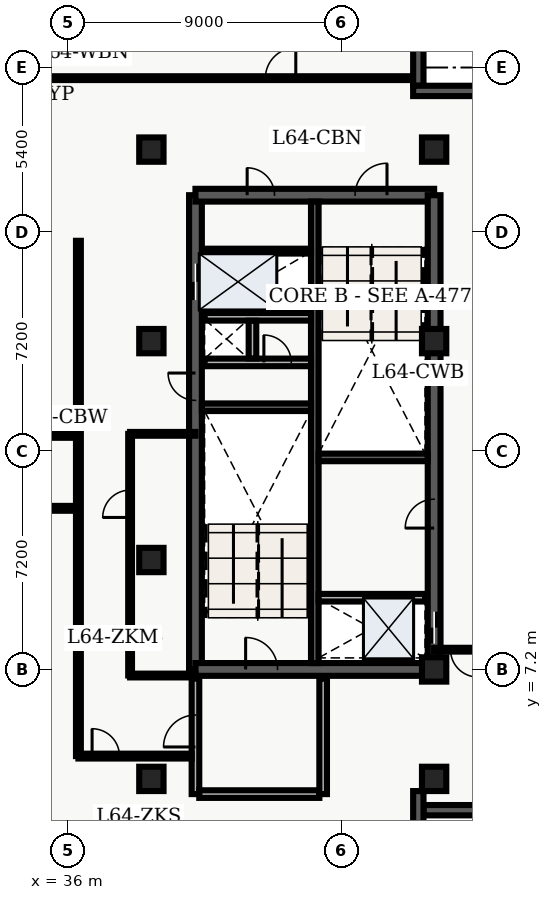
"""IFC4 building model, lengths in metres.
Left out: names, types, materials, properties, quantities, classifications, styles, units other than length and angle.
Written with IfcOpenShell. Run it as: python <this file> out.ifc"""

import sys

from ifc_helpers import new_model, entity, si_unit, converted_unit, direction, frame, origin_with_axes, origin_2d_with_axis, place, context, subcontext, project, spatial, polyline, rectangle, outline, extrude, element, fill, save


model = new_model("IFC4")
c1 = context("Model", 3, precision=1e-05, world=origin_with_axes(), true_north=direction((0.0, 1.0)))
c2 = subcontext(c1, "Body", "Model", "MODEL_VIEW")
j1 = project(units=[si_unit("LENGTHUNIT", "METRE"), converted_unit("PLANEANGLEUNIT", "DEGREE", entity("IfcPlaneAngleMeasure", 0.017), si_unit("PLANEANGLEUNIT", "RADIAN"), dimensions=[0, 0, 0, 0, 0, 0, 0])], contexts=[c1])
p1 = place(None, origin_with_axes())
s1 = spatial("IfcSite", under=j1, at=p1, CompositionType="ELEMENT")
p2 = place(p1, origin_with_axes())
s2 = spatial("IfcBuilding", under=s1, at=p2, CompositionType="ELEMENT")
p3 = place(p2, frame((0.0, 0.0, 260.7), z_axis=(0.0, 0.0, 1.0), x_axis=(1.0, 0.0, 0.0)))
s3 = spatial("IfcBuildingStorey", under=s2, at=p3, CompositionType="ELEMENT", Elevation=260.7)
p4 = place(p3, frame((40.2, 7.2, 0.0), z_axis=(0.0, 0.0, 1.0), x_axis=(0.0, 1.0, 0.0)))
e1 = element("IfcWall", 1, at=p4, inside=s3, PredefinedType="SHEAR", context=c2, shape_type="SweptSolid", body=[
    extrude(outline(polyline([(0.0, -0.21), (15.6, -0.21), (15.6, 0.21), (0.0, 0.21), (0.0, -0.21)])), origin_with_axes(), (0.0, 0.0, 1.0), 3.66),
])
p5 = place(p4, frame((12.75, 0.0, 0.0), z_axis=(0.0, 0.0, 1.0), x_axis=(1.0, 0.0, 0.0)))
e2 = element("IfcOpeningElement", 2, at=p5, cuts=e1, PredefinedType="OPENING", context=c2, shape_type="SweptSolid", body=[
    extrude(rectangle(XDim=1.2, YDim=0.44, at=origin_2d_with_axis()), origin_with_axes(), (0.0, 0.0, 1.0), 2.15),
])
p6 = place(p4, frame((9.3, 0.0, 0.0), z_axis=(0.0, 0.0, 1.0), x_axis=(1.0, 0.0, 0.0)))
e3 = element("IfcOpeningElement", 3, at=p6, cuts=e1, PredefinedType="OPENING", context=c2, shape_type="SweptSolid", body=[
    extrude(rectangle(XDim=0.9, YDim=0.44, at=origin_2d_with_axis()), origin_with_axes(), (0.0, 0.0, 1.0), 2.15),
])
p7 = place(p3, frame((40.2, 7.2, 0.0), z_axis=(0.0, 0.0, 1.0), x_axis=(1.0, 0.0, 0.0)))
e4 = element("IfcWall", 4, at=p7, inside=s3, PredefinedType="SHEAR", context=c2, shape_type="SweptSolid", body=[
    extrude(outline(polyline([(0.0, -0.21), (7.85, -0.21), (7.85, 0.21), (0.0, 0.21), (0.0, -0.21)])), origin_with_axes(), (0.0, 0.0, 1.0), 3.66),
])
p8 = place(p7, frame((2.175, 0.0, 0.0), z_axis=(0.0, 0.0, 1.0), x_axis=(1.0, 0.0, 0.0)))
e5 = element("IfcOpeningElement", 5, at=p8, cuts=e4, PredefinedType="OPENING", context=c2, shape_type="SweptSolid", body=[
    extrude(rectangle(XDim=1.05, YDim=0.44, at=origin_2d_with_axis()), origin_with_axes(), (0.0, 0.0, 1.0), 2.15),
])
p9 = place(p3, frame((40.2, 22.8, 0.0), z_axis=(0.0, 0.0, 1.0), x_axis=(1.0, 0.0, 0.0)))
e6 = element("IfcWall", 6, at=p9, inside=s3, PredefinedType="SHEAR", context=c2, shape_type="SweptSolid", body=[
    extrude(outline(polyline([(0.0, -0.21), (7.85, -0.21), (7.85, 0.21), (0.0, 0.21), (0.0, -0.21)])), origin_with_axes(), (0.0, 0.0, 1.0), 3.66),
])
p10 = place(p9, frame((5.775, 0.0, 0.0), z_axis=(0.0, 0.0, 1.0), x_axis=(1.0, 0.0, 0.0)))
e7 = element("IfcOpeningElement", 7, at=p10, cuts=e6, PredefinedType="OPENING", context=c2, shape_type="SweptSolid", body=[
    extrude(rectangle(XDim=1.05, YDim=0.44, at=origin_2d_with_axis()), origin_with_axes(), (0.0, 0.0, 1.0), 2.15),
])
p11 = place(p9, frame((2.15, 0.0, 0.0), z_axis=(0.0, 0.0, 1.0), x_axis=(1.0, 0.0, 0.0)))
e8 = element("IfcOpeningElement", 8, at=p11, cuts=e6, PredefinedType="OPENING", context=c2, shape_type="SweptSolid", body=[
    extrude(rectangle(XDim=0.9, YDim=0.44, at=origin_2d_with_axis()), origin_with_axes(), (0.0, 0.0, 1.0), 2.15),
])
p12 = place(p3, frame((48.05, 7.2, 0.0), z_axis=(0.0, 0.0, 1.0), x_axis=(0.0, 1.0, 0.0)))
e9 = element("IfcWall", 9, at=p12, inside=s3, PredefinedType="SHEAR", context=c2, shape_type="SweptSolid", body=[
    extrude(outline(polyline([(0.0, -0.21), (15.6, -0.21), (15.6, 0.21), (0.0, 0.21), (0.0, -0.21)])), origin_with_axes(), (0.0, 0.0, 1.0), 3.66),
])
p13 = place(p12, frame((1.375, 0.0, 0.0), z_axis=(0.0, 0.0, 1.0), x_axis=(1.0, 0.0, 0.0)))
e10 = element("IfcOpeningElement", 10, at=p13, cuts=e9, PredefinedType="OPENING", context=c2, shape_type="SweptSolid", body=[
    extrude(rectangle(XDim=1.05, YDim=0.44, at=origin_2d_with_axis()), origin_with_axes(), (0.0, 0.0, 1.0), 2.15),
])
p14 = place(p12, frame((5.125, 0.0, 0.0), z_axis=(0.0, 0.0, 1.0), x_axis=(1.0, 0.0, 0.0)))
e11 = element("IfcOpeningElement", 11, at=p14, cuts=e9, PredefinedType="OPENING", context=c2, shape_type="SweptSolid", body=[
    extrude(rectangle(XDim=0.95, YDim=0.44, at=origin_2d_with_axis()), origin_with_axes(), (0.0, 0.0, 1.0), 2.15),
])
p15 = place(p3, frame((44.125, 7.41, 0.0), z_axis=(0.0, 0.0, 1.0), x_axis=(0.0, 1.0, 0.0)))
e12 = element("IfcWall", 12, at=p15, inside=s3, PredefinedType="SHEAR", context=c2, shape_type="SweptSolid", body=[
    extrude(outline(polyline([(0.0, -0.125), (15.18, -0.125), (15.18, 0.125), (0.0, 0.125), (0.0, -0.125)])), origin_with_axes(), (0.0, 0.0, 1.0), 3.66),
])
for number, where, z_axis, x_axis in (
    (13, (40.41, 15.825, 0.0), (0.0, 0.0, 1.0), (1.0, 0.0, 0.0)),
    (14, (44.25, 14.175, 0.0), (0.0, 0.0, 1.0), (1.0, 0.0, 0.0)),
):
    element("IfcWall", number, at=place(p3, frame(where, z_axis=z_axis, x_axis=x_axis)), inside=s3, PredefinedType="SHEAR", context=c2, shape_type="SweptSolid", body=[
        extrude(outline(polyline([(0.0, -0.125), (3.59, -0.125), (3.59, 0.125), (0.0, 0.125), (0.0, -0.125)])), origin_with_axes(), (0.0, 0.0, 1.0), 3.66),
    ])
p16 = place(p3, frame((40.5, 17.3, 0.0), z_axis=(0.0, 0.0, 1.0), x_axis=(1.0, 0.0, 0.0)))
e15 = element("IfcWall", 15, at=p16, inside=s3, PredefinedType="SOLIDWALL", context=c2, shape_type="SweptSolid", body=[
    extrude(outline(polyline([(0.0, -0.125), (3.5, -0.125), (3.5, 0.125), (0.0, 0.125), (0.0, -0.125)])), origin_with_axes(), (0.0, 0.0, 1.0), 2.7),
])
p17 = place(p16, frame((2.4, 0.0, 0.0), z_axis=(0.0, 0.0, 1.0), x_axis=(1.0, 0.0, 0.0)))
e16 = element("IfcOpeningElement", 16, at=p17, cuts=e15, PredefinedType="OPENING", context=c2, shape_type="SweptSolid", body=[
    extrude(rectangle(XDim=0.9, YDim=0.27, at=origin_2d_with_axis()), origin_with_axes(), (0.0, 0.0, 1.0), 2.15),
])
p18 = place(p3, frame((40.5, 18.8, 0.0), z_axis=(0.0, 0.0, 1.0), x_axis=(1.0, 0.0, 0.0)))
e17 = element("IfcWall", 17, at=p18, inside=s3, PredefinedType="SOLIDWALL", context=c2, shape_type="SweptSolid", body=[
    extrude(outline(polyline([(0.0, -0.125), (3.5, -0.125), (3.5, 0.125), (0.0, 0.125), (0.0, -0.125)])), origin_with_axes(), (0.0, 0.0, 1.0), 2.7),
])
p19 = place(p3, frame((42.075, 17.43, 0.0), z_axis=(0.0, 0.0, 1.0), x_axis=(0.0, 1.0, 0.0)))
e18 = element("IfcWall", 18, at=p19, inside=s3, PredefinedType="SOLIDWALL", context=c2, shape_type="SweptSolid", body=[
    extrude(outline(polyline([(0.0, -0.125), (1.24, -0.125), (1.24, 0.125), (0.0, 0.125), (0.0, -0.125)])), origin_with_axes(), (0.0, 0.0, 1.0), 2.7),
])
p20 = place(p3, frame((40.2, 3.1, 0.0), z_axis=(0.0, 0.0, 1.0), x_axis=(0.0, 1.0, 0.0)))
e19 = element("IfcWall", 19, at=p20, inside=s3, PredefinedType="SOLIDWALL", context=c2, shape_type="SweptSolid", body=[
    extrude(outline(polyline([(0.0, -0.125), (3.8, -0.125), (3.8, 0.125), (0.0, 0.125), (0.0, -0.125)])), origin_with_axes(), (0.0, 0.0, 1.0), 2.7),
])
p21 = place(p20, frame((2.075, 0.0, 0.0), z_axis=(0.0, 0.0, 1.0), x_axis=(1.0, 0.0, 0.0)))
e20 = element("IfcOpeningElement", 20, at=p21, cuts=e19, PredefinedType="OPENING", context=c2, shape_type="SweptSolid", body=[
    extrude(rectangle(XDim=1.05, YDim=0.27, at=origin_2d_with_axis()), origin_with_axes(), (0.0, 0.0, 1.0), 2.15),
])
p22 = place(p3, frame((40.325, 3.1, 0.0), z_axis=(0.0, 0.0, 1.0), x_axis=(1.0, 0.0, 0.0)))
e21 = element("IfcWall", 21, at=p22, inside=s3, PredefinedType="SOLIDWALL", context=c2, shape_type="SweptSolid", body=[
    extrude(outline(polyline([(0.0, -0.125), (3.95, -0.125), (3.95, 0.125), (0.0, 0.125), (0.0, -0.125)])), origin_with_axes(), (0.0, 0.0, 1.0), 2.7),
])
p23 = place(p3, frame((44.4, 3.1, 0.0), z_axis=(0.0, 0.0, 1.0), x_axis=(0.0, 1.0, 0.0)))
e22 = element("IfcWall", 22, at=p23, inside=s3, PredefinedType="SOLIDWALL", context=c2, shape_type="SweptSolid", body=[
    extrude(outline(polyline([(0.0, -0.125), (3.8, -0.125), (3.8, 0.125), (0.0, 0.125), (0.0, -0.125)])), origin_with_axes(), (0.0, 0.0, 1.0), 2.7),
])
for number, where, z_axis, x_axis in (
    (23, (38.75, 3.6, 0.0), (0.0, 0.0, 1.0), (1.0, 0.0, 0.0)),
    (24, (38.75, 10.8, 0.0), (0.0, 0.0, 1.0), (1.0, 0.0, 0.0)),
    (25, (38.75, 18.0, 0.0), (0.0, 0.0, 1.0), (1.0, 0.0, 0.0)),
    (26, (38.75, 24.3, 0.0), (0.0, 0.0, 1.0), (1.0, 0.0, 0.0)),
    (27, (48.05, 3.6, 0.0), (0.0, 0.0, 1.0), (1.0, 0.0, 0.0)),
    (28, (48.05, 7.2, 0.0), (0.0, 0.0, 1.0), (1.0, 0.0, 0.0)),
    (29, (48.05, 18.0, 0.0), (0.0, 0.0, 1.0), (1.0, 0.0, 0.0)),
    (30, (48.05, 24.3, 0.0), (0.0, 0.0, 1.0), (1.0, 0.0, 0.0)),
):
    element("IfcColumn", number, at=place(p3, frame(where, z_axis=z_axis, x_axis=x_axis)), inside=s3, PredefinedType="COLUMN", context=c2, shape_type="SweptSolid", body=[
        extrude(rectangle(XDim=0.8, YDim=0.8, at=origin_2d_with_axis()), origin_with_axes(), (0.0, 0.0, 1.0), 3.9),
    ])
p24 = place(p3, frame((40.5, 20.96, 0.0), z_axis=(0.0, 0.0, 1.0), x_axis=(1.0, 0.0, 0.0)))
e31 = element("IfcWall", 31, at=p24, inside=s3, PredefinedType="PARTITIONING", context=c2, shape_type="SweptSolid", body=[
    extrude(outline(polyline([(0.0, -0.08), (3.5, -0.08), (3.5, 0.08), (0.0, 0.08), (0.0, -0.08)])), origin_with_axes(), (0.0, 0.0, 1.0), 2.7),
])
p25 = place(p3, frame((44.25, 9.56, 0.0), z_axis=(0.0, 0.0, 1.0), x_axis=(1.0, 0.0, 0.0)))
e32 = element("IfcWall", 32, at=p25, inside=s3, PredefinedType="SOLIDWALL", context=c2, shape_type="SweptSolid", body=[
    extrude(outline(polyline([(0.0, -0.125), (3.5, -0.125), (3.5, 0.125), (0.0, 0.125), (0.0, -0.125)])), origin_with_axes(), (0.0, 0.0, 1.0), 2.7),
])
p26 = place(p3, frame((20.3, 12.5, 0.0), z_axis=(0.0, 0.0, 1.0), x_axis=(1.0, 0.0, 0.0)))
e33 = element("IfcWall", 33, at=p26, inside=s3, PredefinedType="PARTITIONING", context=c2, shape_type="SweptSolid", body=[
    extrude(outline(polyline([(0.0, -0.08), (16.05, -0.08), (16.05, 0.08), (0.0, 0.08), (0.0, -0.08)])), origin_with_axes(), (0.0, 0.0, 1.0), 2.7),
])
p27 = place(p26, frame((3.662, 0.0, 0.0), z_axis=(0.0, 0.0, 1.0), x_axis=(1.0, 0.0, 0.0)))
e34 = element("IfcOpeningElement", 34, at=p27, cuts=e33, PredefinedType="OPENING", context=c2, shape_type="SweptSolid", body=[
    extrude(rectangle(XDim=1.0, YDim=0.18, at=origin_2d_with_axis()), origin_with_axes(), (0.0, 0.0, 1.0), 2.15),
])
p28 = place(p26, frame((11.557, 0.0, 0.0), z_axis=(0.0, 0.0, 1.0), x_axis=(1.0, 0.0, 0.0)))
e35 = element("IfcOpeningElement", 35, at=p28, cuts=e33, PredefinedType="OPENING", context=c2, shape_type="SweptSolid", body=[
    extrude(rectangle(XDim=1.0, YDim=0.18, at=origin_2d_with_axis()), origin_with_axes(), (0.0, 0.0, 1.0), 2.15),
])
p29 = place(p3, frame((20.3, 14.9, 0.0), z_axis=(0.0, 0.0, 1.0), x_axis=(1.0, 0.0, 0.0)))
e36 = element("IfcWall", 36, at=p29, inside=s3, PredefinedType="PARTITIONING", context=c2, shape_type="SweptSolid", body=[
    extrude(outline(polyline([(0.0, -0.08), (16.05, -0.08), (16.05, 0.08), (0.0, 0.08), (0.0, -0.08)])), origin_with_axes(), (0.0, 0.0, 1.0), 2.7),
])
p30 = place(p29, frame((3.759, 0.0, 0.0), z_axis=(0.0, 0.0, 1.0), x_axis=(1.0, 0.0, 0.0)))
e37 = element("IfcOpeningElement", 37, at=p30, cuts=e36, PredefinedType="OPENING", context=c2, shape_type="SweptSolid", body=[
    extrude(rectangle(XDim=1.0, YDim=0.18, at=origin_2d_with_axis()), origin_with_axes(), (0.0, 0.0, 1.0), 2.15),
])
p31 = place(p29, frame((11.654, 0.0, 0.0), z_axis=(0.0, 0.0, 1.0), x_axis=(1.0, 0.0, 0.0)))
e38 = element("IfcOpeningElement", 38, at=p31, cuts=e36, PredefinedType="OPENING", context=c2, shape_type="SweptSolid", body=[
    extrude(rectangle(XDim=1.0, YDim=0.18, at=origin_2d_with_axis()), origin_with_axes(), (0.0, 0.0, 1.0), 2.15),
])
p32 = place(p3, frame((36.35, 4.35, 0.0), z_axis=(0.0, 0.0, 1.0), x_axis=(0.0, 1.0, 0.0)))
e39 = element("IfcWall", 39, at=p32, inside=s3, PredefinedType="PARTITIONING", context=c2, shape_type="SweptSolid", body=[
    extrude(outline(polyline([(0.0, -0.08), (16.95, -0.08), (16.95, 0.08), (0.0, 0.08), (0.0, -0.08)])), origin_with_axes(), (0.0, 0.0, 1.0), 2.7),
])
p33 = place(p3, frame((49.765, 7.85, 0.0), z_axis=(0.0, 0.0, 1.0), x_axis=(-1.0, 0.0, 0.0)))
e40 = element("IfcWall", 40, at=p33, inside=s3, PredefinedType="PARTITIONING", context=c2, shape_type="SweptSolid", body=[
    extrude(outline(polyline([(0.0, -0.062), (1.715, -0.062), (1.715, 0.062), (0.0, 0.062), (0.0, -0.062)])), origin_with_axes(), (0.0, 0.0, 1.0), 2.7),
])
p34 = place(p33, frame((0.725, 0.0, 0.0), z_axis=(0.0, 0.0, 1.0), x_axis=(1.0, 0.0, 0.0)))
e41 = element("IfcOpeningElement", 41, at=p34, cuts=e40, PredefinedType="OPENING", context=c2, shape_type="SweptSolid", body=[
    extrude(rectangle(XDim=0.9, YDim=0.145, at=origin_2d_with_axis()), origin_with_axes(), (0.0, 0.0, 1.0), 2.15),
])
p35 = place(p3, frame((34.535, 26.65, 0.0), z_axis=(0.0, 0.0, 1.0), x_axis=(1.0, 0.0, 0.0)))
e42 = element("IfcWall", 42, at=p35, inside=s3, PredefinedType="PARTITIONING", context=c2, shape_type="SweptSolid", body=[
    extrude(outline(polyline([(0.0, -0.062), (12.995, -0.062), (12.995, 0.062), (0.0, 0.062), (0.0, -0.062)])), origin_with_axes(), (0.0, 0.0, 1.0), 2.7),
])
p36 = place(p35, frame((8.465, 0.0, 0.0), z_axis=(0.0, 0.0, 1.0), x_axis=(1.0, 0.0, 0.0)))
e43 = element("IfcOpeningElement", 43, at=p36, cuts=e42, PredefinedType="OPENING", context=c2, shape_type="SweptSolid", body=[
    extrude(rectangle(XDim=1.0, YDim=0.145, at=origin_2d_with_axis()), origin_with_axes(), (0.0, 0.0, 1.0), 2.15),
])
p37 = place(p3, frame((36.35, 4.35, 0.0), z_axis=(0.0, 0.0, 1.0), x_axis=(1.0, 0.0, 0.0)))
e44 = element("IfcWall", 44, at=p37, inside=s3, PredefinedType="PARTITIONING", context=c2, shape_type="SweptSolid", body=[
    extrude(outline(polyline([(0.0, -0.08), (3.725, -0.08), (3.725, 0.08), (0.0, 0.08), (0.0, -0.08)])), origin_with_axes(), (0.0, 0.0, 1.0), 2.7),
])
p38 = place(p37, frame((0.9, 0.0, 0.0), z_axis=(0.0, 0.0, 1.0), x_axis=(1.0, 0.0, 0.0)))
e45 = element("IfcOpeningElement", 45, at=p38, cuts=e44, PredefinedType="OPENING", context=c2, shape_type="SweptSolid", body=[
    extrude(rectangle(XDim=0.9, YDim=0.18, at=origin_2d_with_axis()), origin_with_axes(), (0.0, 0.0, 1.0), 2.15),
])
for number, where, z_axis, x_axis in (
    (46, (38.05, 7.0, 0.0), (0.0, 0.0, 1.0), (1.0, 0.0, 0.0)),
    (47, (38.05, 14.95, 0.0), (0.0, 0.0, 1.0), (1.0, 0.0, 0.0)),
):
    element("IfcWall", number, at=place(p3, frame(where, z_axis=z_axis, x_axis=x_axis)), inside=s3, PredefinedType="PARTITIONING", context=c2, shape_type="SweptSolid", body=[
        extrude(outline(polyline([(0.0, -0.062), (2.15, -0.062), (2.15, 0.062), (0.0, 0.062), (0.0, -0.062)])), origin_with_axes(), (0.0, 0.0, 1.0), 2.7),
    ])
p39 = place(p3, frame((38.05, 7.0, 0.0), z_axis=(0.0, 0.0, 1.0), x_axis=(0.0, 1.0, 0.0)))
e48 = element("IfcWall", 48, at=p39, inside=s3, PredefinedType="PARTITIONING", context=c2, shape_type="SweptSolid", body=[
    extrude(outline(polyline([(0.0, -0.062), (7.95, -0.062), (7.95, 0.062), (0.0, 0.062), (0.0, -0.062)])), origin_with_axes(), (0.0, 0.0, 1.0), 2.7),
])
p40 = place(p39, frame((5.65, 0.0, 0.0), z_axis=(0.0, 0.0, 1.0), x_axis=(1.0, 0.0, 0.0)))
e49 = element("IfcOpeningElement", 49, at=p40, cuts=e48, PredefinedType="OPENING", context=c2, shape_type="SweptSolid", body=[
    extrude(rectangle(XDim=0.9, YDim=0.145, at=origin_2d_with_axis()), origin_with_axes(), (0.0, 0.0, 1.0), 2.15),
])
p41 = place(p3, frame((47.53, 28.46, 0.0), z_axis=(0.0, 0.0, 1.0), x_axis=(0.0, -1.0, 0.0)))
e50 = element("IfcWall", 50, at=p41, inside=s3, PredefinedType="SOLIDWALL", context=c2, shape_type="SweptSolid", body=[
    extrude(outline(polyline([(0.0, -0.17), (2.06, -0.17), (2.06, 0.17), (0.0, 0.17), (0.0, -0.17)])), origin_with_axes(), (0.0, 0.0, 1.0), 3.66),
])
p42 = place(p3, frame((47.36, 26.23, 0.0), z_axis=(0.0, 0.0, 1.0), x_axis=(1.0, 0.0, 0.0)))
e51 = element("IfcWall", 51, at=p42, inside=s3, PredefinedType="SOLIDWALL", context=c2, shape_type="SweptSolid", body=[
    extrude(outline(polyline([(0.0, -0.17), (2.74, -0.17), (2.74, 0.17), (0.0, 0.17), (0.0, -0.17)])), origin_with_axes(), (0.0, 0.0, 1.0), 3.66),
])
p43 = place(p3, frame((49.76, 2.57, 0.0), z_axis=(0.0, 0.0, 1.0), x_axis=(-1.0, 0.0, 0.0)))
e52 = element("IfcWall", 52, at=p43, inside=s3, PredefinedType="SOLIDWALL", context=c2, shape_type="SweptSolid", body=[
    extrude(outline(polyline([(0.0, -0.17), (2.06, -0.17), (2.06, 0.17), (0.0, 0.17), (0.0, -0.17)])), origin_with_axes(), (0.0, 0.0, 1.0), 3.66),
])
p44 = place(p3, frame((47.53, 3.2, 0.0), z_axis=(0.0, 0.0, 1.0), x_axis=(0.0, -1.0, 0.0)))
e53 = element("IfcWall", 53, at=p44, inside=s3, PredefinedType="SOLIDWALL", context=c2, shape_type="SweptSolid", body=[
    extrude(outline(polyline([(0.0, -0.17), (3.2, -0.17), (3.2, 0.17), (0.0, 0.17), (0.0, -0.17)])), origin_with_axes(), (0.0, 0.0, 1.0), 3.66),
])
p45 = place(p12, frame((1.375, 0.0, 0.0), z_axis=(0.0, 0.0, 1.0), x_axis=(1.0, 0.0, 0.0)))
e54 = element("IfcDoor", 54, at=p45, inside=s3, OperationType="SLIDING_TO_LEFT", PredefinedType="DOOR", context=c2, shape_type="SweptSolid", body=[
    extrude(rectangle(XDim=1.05, YDim=0.09, at=origin_2d_with_axis()), origin_with_axes(), (0.0, 0.0, 1.0), 2.15),
])
fill(e10, e54)
p46 = place(p4, frame((12.75, 0.0, 0.0), z_axis=(0.0, 0.0, 1.0), x_axis=(1.0, 0.0, 0.0)))
e55 = element("IfcDoor", 55, at=p46, inside=s3, OperationType="DOUBLE_DOOR_SLIDING", PredefinedType="DOOR", context=c2, shape_type="SweptSolid", body=[
    extrude(rectangle(XDim=1.2, YDim=0.09, at=origin_2d_with_axis()), origin_with_axes(), (0.0, 0.0, 1.0), 2.15),
])
fill(e2, e55)
p47 = place(p4, frame((9.3, 0.0, 0.0), z_axis=(0.0, 0.0, 1.0), x_axis=(1.0, 0.0, 0.0)))
e56 = element("IfcDoor", 56, at=p47, inside=s3, OperationType="SINGLE_SWING_RIGHT", PredefinedType="DOOR", context=c2, shape_type="SweptSolid", body=[
    extrude(rectangle(XDim=0.9, YDim=0.09, at=origin_2d_with_axis()), origin_with_axes(), (0.0, 0.0, 1.0), 2.15),
])
fill(e3, e56)
p48 = place(p16, frame((2.4, 0.0, 0.0), z_axis=(0.0, 0.0, 1.0), x_axis=(1.0, 0.0, 0.0)))
e57 = element("IfcDoor", 57, at=p48, inside=s3, OperationType="SINGLE_SWING_LEFT", PredefinedType="DOOR", context=c2, shape_type="SweptSolid", body=[
    extrude(rectangle(XDim=0.9, YDim=0.09, at=origin_2d_with_axis()), origin_with_axes(), (0.0, 0.0, 1.0), 2.15),
])
fill(e16, e57)
p49 = place(p7, frame((2.175, 0.0, 0.0), z_axis=(0.0, 0.0, 1.0), x_axis=(1.0, 0.0, 0.0)))
e58 = element("IfcDoor", 58, at=p49, inside=s3, OperationType="SINGLE_SWING_LEFT", PredefinedType="DOOR", context=c2, shape_type="SweptSolid", body=[
    extrude(rectangle(XDim=1.05, YDim=0.09, at=origin_2d_with_axis()), origin_with_axes(), (0.0, 0.0, 1.0), 2.15),
])
fill(e5, e58)
p50 = place(p9, frame((5.775, 0.0, 0.0), z_axis=(0.0, 0.0, 1.0), x_axis=(1.0, 0.0, 0.0)))
e59 = element("IfcDoor", 59, at=p50, inside=s3, OperationType="SINGLE_SWING_RIGHT", PredefinedType="DOOR", context=c2, shape_type="SweptSolid", body=[
    extrude(rectangle(XDim=1.05, YDim=0.09, at=origin_2d_with_axis()), origin_with_axes(), (0.0, 0.0, 1.0), 2.15),
])
fill(e7, e59)
p51 = place(p20, frame((2.075, 0.0, 0.0), z_axis=(0.0, 0.0, 1.0), x_axis=(1.0, 0.0, 0.0)))
e60 = element("IfcDoor", 60, at=p51, inside=s3, OperationType="SINGLE_SWING_LEFT", PredefinedType="DOOR", context=c2, shape_type="SweptSolid", body=[
    extrude(rectangle(XDim=1.05, YDim=0.09, at=origin_2d_with_axis()), origin_with_axes(), (0.0, 0.0, 1.0), 2.15),
])
fill(e20, e60)
p52 = place(p9, frame((2.15, 0.0, 0.0), z_axis=(0.0, 0.0, 1.0), x_axis=(1.0, 0.0, 0.0)))
e61 = element("IfcDoor", 61, at=p52, inside=s3, OperationType="SINGLE_SWING_LEFT", PredefinedType="DOOR", context=c2, shape_type="SweptSolid", body=[
    extrude(rectangle(XDim=0.9, YDim=0.09, at=origin_2d_with_axis()), origin_with_axes(), (0.0, 0.0, 1.0), 2.15),
])
fill(e8, e61)
p53 = place(p12, frame((5.125, 0.0, 0.0), z_axis=(0.0, 0.0, 1.0), x_axis=(1.0, 0.0, 0.0)))
e62 = element("IfcDoor", 62, at=p53, inside=s3, OperationType="SINGLE_SWING_LEFT", PredefinedType="DOOR", context=c2, shape_type="SweptSolid", body=[
    extrude(rectangle(XDim=0.95, YDim=0.09, at=origin_2d_with_axis()), origin_with_axes(), (0.0, 0.0, 1.0), 2.15),
])
fill(e11, e62)
p54 = place(p33, frame((0.725, 0.0, 0.0), z_axis=(0.0, 0.0, 1.0), x_axis=(1.0, 0.0, 0.0)))
e63 = element("IfcDoor", 63, at=p54, inside=s3, OperationType="SINGLE_SWING_LEFT", PredefinedType="DOOR", context=c2, shape_type="SweptSolid", body=[
    extrude(rectangle(XDim=0.9, YDim=0.075, at=origin_2d_with_axis()), origin_with_axes(), (0.0, 0.0, 1.0), 2.15),
])
fill(e41, e63)
p55 = place(p35, frame((8.465, 0.0, 0.0), z_axis=(0.0, 0.0, 1.0), x_axis=(1.0, 0.0, 0.0)))
e64 = element("IfcDoor", 64, at=p55, inside=s3, OperationType="SINGLE_SWING_RIGHT", PredefinedType="DOOR", context=c2, shape_type="SweptSolid", body=[
    extrude(rectangle(XDim=1.0, YDim=0.075, at=origin_2d_with_axis()), origin_with_axes(), (0.0, 0.0, 1.0), 2.15),
])
fill(e43, e64)
p56 = place(p37, frame((0.9, 0.0, 0.0), z_axis=(0.0, 0.0, 1.0), x_axis=(1.0, 0.0, 0.0)))
e65 = element("IfcDoor", 65, at=p56, inside=s3, OperationType="SINGLE_SWING_LEFT", PredefinedType="DOOR", context=c2, shape_type="SweptSolid", body=[
    extrude(rectangle(XDim=0.9, YDim=0.09, at=origin_2d_with_axis()), origin_with_axes(), (0.0, 0.0, 1.0), 2.15),
])
fill(e45, e65)
p57 = place(p39, frame((5.65, 0.0, 0.0), z_axis=(0.0, 0.0, 1.0), x_axis=(1.0, 0.0, 0.0)))
e66 = element("IfcDoor", 66, at=p57, inside=s3, OperationType="SINGLE_SWING_LEFT", PredefinedType="DOOR", context=c2, shape_type="SweptSolid", body=[
    extrude(rectangle(XDim=0.9, YDim=0.075, at=origin_2d_with_axis()), origin_with_axes(), (0.0, 0.0, 1.0), 2.15),
])
fill(e49, e66)
save(model, sys.argv[1])
